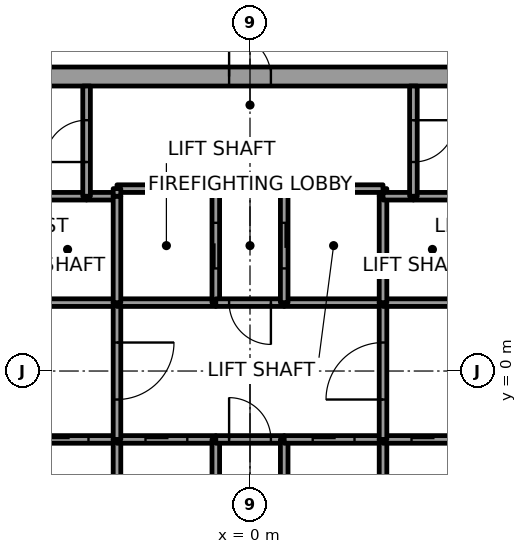
"""IFC4 building model, lengths in metres.
Left out: names, types, materials, properties, quantities, classifications, styles, units other than length and angle.
Written with IfcOpenShell. Run it as: python <this file> out.ifc"""

import sys

from ifc_helpers import new_model, si_unit, direction, frame, frame_2d, origin, place, context, subcontext, project, spatial, rectangle, extrude, element, fill, save


model = new_model("IFC4")
c1 = context("Model", 3, precision=1e-05, world=origin(), true_north=direction((0.0, 1.0)))
c2 = subcontext(c1, "Body", "Model", "MODEL_VIEW")
j1 = project(units=[si_unit("LENGTHUNIT", "METRE"), si_unit("PLANEANGLEUNIT", "RADIAN")], contexts=[c1])
p1 = place(None, origin())
s1 = spatial("IfcSite", under=j1, at=p1, CompositionType="ELEMENT")
p2 = place(p1, origin())
s2 = spatial("IfcBuilding", under=s1, at=p2, CompositionType="ELEMENT")
p3 = place(p2, frame((0.0, 0.0, 209.8)))
s3 = spatial("IfcBuildingStorey", under=s2, at=p3, CompositionType="ELEMENT", Elevation=209.8)
p4 = place(p3, frame((-11.0, 7.75, 0.0), z_axis=(0.0, 0.0, 1.0), x_axis=(1.0, 0.0, 0.0)))
e1 = element("IfcWall", 1, at=p4, inside=s3, PredefinedType="SHEAR", context=c2, shape_type="SweptSolid", body=[
    extrude(rectangle(XDim=22.0, YDim=0.5, at=frame_2d((11.0, 0.0))), origin(), (0.0, 0.0, 1.0), 4.0),
])
p5 = place(p4, frame((10.45, 0.0, 0.0)))
e2 = element("IfcOpeningElement", 2, at=p5, cuts=e1, PredefinedType="OPENING", context=c2, shape_type="SweptSolid", body=[
    extrude(rectangle(XDim=1.1, YDim=2.1, at=frame_2d((0.55, 1.05))), frame((0.0, 0.25, 0.0), z_axis=(0.0, -1.0, 0.0), x_axis=(1.0, 0.0, 0.0)), (0.0, 0.0, 1.0), 0.5),
])
p6 = place(p3, frame((-6.1, -1.8, 0.0), z_axis=(0.0, 0.0, 1.0), x_axis=(1.0, 0.0, 0.0)))
e3 = element("IfcWall", 3, at=p6, inside=s3, PredefinedType="SOLIDWALL", context=c2, shape_type="SweptSolid", body=[
    extrude(rectangle(XDim=2.6, YDim=0.2, at=frame_2d((1.3, 0.0))), origin(), (0.0, 0.0, 1.0), 3.85),
])
p7 = place(p6, frame((0.75, 0.0, 0.0)))
e4 = element("IfcOpeningElement", 4, at=p7, cuts=e3, PredefinedType="OPENING", context=c2, shape_type="SweptSolid", body=[
    extrude(rectangle(XDim=1.1, YDim=2.1, at=frame_2d((0.55, 1.05))), frame((0.0, 0.1, 0.0), z_axis=(0.0, -1.0, 0.0), x_axis=(1.0, 0.0, 0.0)), (0.0, 0.0, 1.0), 0.2),
])
p8 = place(p3, frame((-3.5, 1.8, 0.0), z_axis=(0.0, 0.0, 1.0), x_axis=(-1.0, 0.0, 0.0)))
e5 = element("IfcWall", 5, at=p8, inside=s3, PredefinedType="SOLIDWALL", context=c2, shape_type="SweptSolid", body=[
    extrude(rectangle(XDim=2.6, YDim=0.2, at=frame_2d((1.3, 0.0))), origin(), (0.0, 0.0, 1.0), 3.85),
])
p9 = place(p3, frame((-4.3, 4.6, 0.0), z_axis=(0.0, 0.0, 1.0), x_axis=(-1.0, 0.0, 0.0)))
e6 = element("IfcWall", 6, at=p9, inside=s3, PredefinedType="SOLIDWALL", context=c2, shape_type="SweptSolid", body=[
    extrude(rectangle(XDim=1.8, YDim=0.2, at=frame_2d((0.9, 0.0))), origin(), (0.0, 0.0, 1.0), 3.85),
])
p10 = place(p3, frame((-3.5, 4.6, 0.0), z_axis=(0.0, 0.0, 1.0), x_axis=(-1.0, 0.0, 0.0)))
e7 = element("IfcWall", 7, at=p10, inside=s3, PredefinedType="SOLIDWALL", context=c2, shape_type="SweptSolid", body=[
    extrude(rectangle(XDim=0.8, YDim=0.2, at=frame_2d((0.4, 0.0))), origin(), (0.0, 0.0, 1.0), 3.85),
])
p11 = place(p3, frame((-4.3, 4.6, 0.0), z_axis=(0.0, 0.0, 1.0), x_axis=(0.0, 1.0, 0.0)))
e8 = element("IfcWall", 8, at=p11, inside=s3, PredefinedType="SOLIDWALL", context=c2, shape_type="SweptSolid", body=[
    extrude(rectangle(XDim=2.9, YDim=0.2, at=frame_2d((1.45, 0.0))), origin(), (0.0, 0.0, 1.0), 3.85),
])
p12 = place(p11, frame((0.9, 0.0, 0.0)))
e9 = element("IfcOpeningElement", 9, at=p12, cuts=e8, PredefinedType="OPENING", context=c2, shape_type="SweptSolid", body=[
    extrude(rectangle(XDim=1.1, YDim=2.1, at=frame_2d((0.55, 1.05))), frame((0.0, 0.1, 0.0), z_axis=(0.0, -1.0, 0.0), x_axis=(1.0, 0.0, 0.0)), (0.0, 0.0, 1.0), 0.2),
])
p13 = place(p3, frame((-3.5, -4.6, 0.0), z_axis=(0.0, 0.0, 1.0), x_axis=(0.0, 1.0, 0.0)))
e10 = element("IfcWall", 10, at=p13, inside=s3, PredefinedType="SOLIDWALL", context=c2, shape_type="SweptSolid", body=[
    extrude(rectangle(XDim=2.8, YDim=0.2, at=frame_2d((1.4, 0.0))), origin(), (0.0, 0.0, 1.0), 3.85),
])
p14 = place(p3, frame((-3.5, -1.8, 0.0), z_axis=(0.0, 0.0, 1.0), x_axis=(1.0, 0.0, 0.0)))
e11 = element("IfcWall", 11, at=p14, inside=s3, PredefinedType="SOLIDWALL", context=c2, shape_type="SweptSolid", body=[
    extrude(rectangle(XDim=2.6, YDim=0.2, at=frame_2d((1.3, 0.0))), origin(), (0.0, 0.0, 1.0), 3.85),
])
p15 = place(p14, frame((0.75, 0.0, 0.0)))
e12 = element("IfcOpeningElement", 12, at=p15, cuts=e11, PredefinedType="OPENING", context=c2, shape_type="SweptSolid", body=[
    extrude(rectangle(XDim=1.1, YDim=2.1, at=frame_2d((0.55, 1.05))), frame((0.0, 0.1, 0.0), z_axis=(0.0, -1.0, 0.0), x_axis=(1.0, 0.0, 0.0)), (0.0, 0.0, 1.0), 0.2),
])
p16 = place(p3, frame((-3.5, 1.8, 0.0), z_axis=(0.0, 0.0, 1.0), x_axis=(0.0, -1.0, 0.0)))
e13 = element("IfcWall", 13, at=p16, inside=s3, PredefinedType="SOLIDWALL", context=c2, shape_type="SweptSolid", body=[
    extrude(rectangle(XDim=3.6, YDim=0.2, at=frame_2d((1.8, 0.0))), origin(), (0.0, 0.0, 1.0), 3.85),
])
p17 = place(p16, frame((1.05, 0.0, 0.0)))
e14 = element("IfcOpeningElement", 14, at=p17, cuts=e13, PredefinedType="OPENING", context=c2, shape_type="SweptSolid", body=[
    extrude(rectangle(XDim=1.5, YDim=2.1, at=frame_2d((0.75, 1.05))), frame((0.0, 0.1, 0.0), z_axis=(0.0, -1.0, 0.0), x_axis=(1.0, 0.0, 0.0)), (0.0, 0.0, 1.0), 0.2),
])
p18 = place(p3, frame((-0.9, 1.8, 0.0), z_axis=(0.0, 0.0, 1.0), x_axis=(-1.0, 0.0, 0.0)))
e15 = element("IfcWall", 15, at=p18, inside=s3, PredefinedType="SOLIDWALL", context=c2, shape_type="SweptSolid", body=[
    extrude(rectangle(XDim=2.6, YDim=0.2, at=frame_2d((1.3, 0.0))), origin(), (0.0, 0.0, 1.0), 3.85),
])
p19 = place(p3, frame((-3.5, 4.6, 0.0), z_axis=(0.0, 0.0, 1.0), x_axis=(0.0, -1.0, 0.0)))
e16 = element("IfcWall", 16, at=p19, inside=s3, PredefinedType="SOLIDWALL", context=c2, shape_type="SweptSolid", body=[
    extrude(rectangle(XDim=2.8, YDim=0.2, at=frame_2d((1.4, 0.0))), origin(), (0.0, 0.0, 1.0), 3.85),
])
p20 = place(p3, frame((-0.9, 1.8, 0.0), z_axis=(0.0, 0.0, 1.0), x_axis=(0.0, 1.0, 0.0)))
e17 = element("IfcWall", 17, at=p20, inside=s3, PredefinedType="SOLIDWALL", context=c2, shape_type="SweptSolid", body=[
    extrude(rectangle(XDim=3.0, YDim=0.2, at=frame_2d((1.5, 0.0))), origin(), (0.0, 0.0, 1.0), 3.85),
])
p21 = place(p20, frame((0.9, 0.0, 0.0)))
e18 = element("IfcOpeningElement", 18, at=p21, cuts=e17, PredefinedType="OPENING", context=c2, shape_type="SweptSolid", body=[
    extrude(rectangle(XDim=1.2, YDim=2.1, at=frame_2d((0.6, 1.05))), frame((0.0, 0.1, 0.0), z_axis=(0.0, -1.0, 0.0), x_axis=(1.0, 0.0, 0.0)), (0.0, 0.0, 1.0), 0.2),
])
p22 = place(p3, frame((-0.9, 4.8, 0.0), z_axis=(0.0, 0.0, 1.0), x_axis=(-1.0, 0.0, 0.0)))
e19 = element("IfcWall", 19, at=p22, inside=s3, PredefinedType="SOLIDWALL", context=c2, shape_type="SweptSolid", body=[
    extrude(rectangle(XDim=2.6, YDim=0.2, at=frame_2d((1.3, 0.0))), origin(), (0.0, 0.0, 1.0), 3.85),
])
p23 = place(p3, frame((-3.5, 4.8, 0.0), z_axis=(0.0, 0.0, 1.0), x_axis=(0.0, -1.0, 0.0)))
e20 = element("IfcWall", 20, at=p23, inside=s3, PredefinedType="SOLIDWALL", context=c2, shape_type="SweptSolid", body=[
    extrude(rectangle(XDim=0.2, YDim=0.2, at=frame_2d((0.1, 0.0))), origin(), (0.0, 0.0, 1.0), 3.85),
])
p24 = place(p3, frame((-0.9, -4.6, 0.0), z_axis=(0.0, 0.0, 1.0), x_axis=(0.0, 1.0, 0.0)))
e21 = element("IfcWall", 21, at=p24, inside=s3, PredefinedType="SOLIDWALL", context=c2, shape_type="SweptSolid", body=[
    extrude(rectangle(XDim=2.8, YDim=0.2, at=frame_2d((1.4, 0.0))), origin(), (0.0, 0.0, 1.0), 3.85),
])
p25 = place(p3, frame((-0.9, -1.8, 0.0), z_axis=(0.0, 0.0, 1.0), x_axis=(1.0, 0.0, 0.0)))
e22 = element("IfcWall", 22, at=p25, inside=s3, PredefinedType="SOLIDWALL", context=c2, shape_type="SweptSolid", body=[
    extrude(rectangle(XDim=1.8, YDim=0.2, at=frame_2d((0.9, 0.0))), origin(), (0.0, 0.0, 1.0), 3.85),
])
p26 = place(p25, frame((0.35, 0.0, 0.0)))
e23 = element("IfcOpeningElement", 23, at=p26, cuts=e22, PredefinedType="OPENING", context=c2, shape_type="SweptSolid", body=[
    extrude(rectangle(XDim=1.1, YDim=2.1, at=frame_2d((0.55, 1.05))), frame((0.0, 0.1, 0.0), z_axis=(0.0, -1.0, 0.0), x_axis=(1.0, 0.0, 0.0)), (0.0, 0.0, 1.0), 0.2),
])
p27 = place(p3, frame((0.9, 1.8, 0.0), z_axis=(0.0, 0.0, 1.0), x_axis=(-1.0, 0.0, 0.0)))
e24 = element("IfcWall", 24, at=p27, inside=s3, PredefinedType="SOLIDWALL", context=c2, shape_type="SweptSolid", body=[
    extrude(rectangle(XDim=1.8, YDim=0.2, at=frame_2d((0.9, 0.0))), origin(), (0.0, 0.0, 1.0), 3.85),
])
p28 = place(p27, frame((0.35, 0.0, 0.0)))
e25 = element("IfcOpeningElement", 25, at=p28, cuts=e24, PredefinedType="OPENING", context=c2, shape_type="SweptSolid", body=[
    extrude(rectangle(XDim=1.1, YDim=2.1, at=frame_2d((0.55, 1.05))), frame((0.0, 0.1, 0.0), z_axis=(0.0, -1.0, 0.0), x_axis=(1.0, 0.0, 0.0)), (0.0, 0.0, 1.0), 0.2),
])
p29 = place(p3, frame((0.9, -1.8, 0.0), z_axis=(0.0, 0.0, 1.0), x_axis=(0.0, -1.0, 0.0)))
e26 = element("IfcWall", 26, at=p29, inside=s3, PredefinedType="SOLIDWALL", context=c2, shape_type="SweptSolid", body=[
    extrude(rectangle(XDim=2.8, YDim=0.2, at=frame_2d((1.4, 0.0))), origin(), (0.0, 0.0, 1.0), 3.85),
])
p30 = place(p3, frame((0.9, -1.8, 0.0), z_axis=(0.0, 0.0, 1.0), x_axis=(1.0, 0.0, 0.0)))
e27 = element("IfcWall", 27, at=p30, inside=s3, PredefinedType="SOLIDWALL", context=c2, shape_type="SweptSolid", body=[
    extrude(rectangle(XDim=2.6, YDim=0.2, at=frame_2d((1.3, 0.0))), origin(), (0.0, 0.0, 1.0), 3.85),
])
p31 = place(p30, frame((0.75, 0.0, 0.0)))
e28 = element("IfcOpeningElement", 28, at=p31, cuts=e27, PredefinedType="OPENING", context=c2, shape_type="SweptSolid", body=[
    extrude(rectangle(XDim=1.1, YDim=2.1, at=frame_2d((0.55, 1.05))), frame((0.0, 0.1, 0.0), z_axis=(0.0, -1.0, 0.0), x_axis=(1.0, 0.0, 0.0)), (0.0, 0.0, 1.0), 0.2),
])
p32 = place(p3, frame((3.5, 1.8, 0.0), z_axis=(0.0, 0.0, 1.0), x_axis=(-1.0, 0.0, 0.0)))
e29 = element("IfcWall", 29, at=p32, inside=s3, PredefinedType="SOLIDWALL", context=c2, shape_type="SweptSolid", body=[
    extrude(rectangle(XDim=2.6, YDim=0.2, at=frame_2d((1.3, 0.0))), origin(), (0.0, 0.0, 1.0), 3.85),
])
p33 = place(p3, frame((3.5, 4.6, 0.0), z_axis=(0.0, 0.0, 1.0), x_axis=(0.0, 1.0, 0.0)))
e30 = element("IfcWall", 30, at=p33, inside=s3, PredefinedType="SOLIDWALL", context=c2, shape_type="SweptSolid", body=[
    extrude(rectangle(XDim=0.2, YDim=0.2, at=frame_2d((0.1, 0.0))), origin(), (0.0, 0.0, 1.0), 3.85),
])
p34 = place(p3, frame((3.5, 4.8, 0.0), z_axis=(0.0, 0.0, 1.0), x_axis=(-1.0, 0.0, 0.0)))
e31 = element("IfcWall", 31, at=p34, inside=s3, PredefinedType="SOLIDWALL", context=c2, shape_type="SweptSolid", body=[
    extrude(rectangle(XDim=2.6, YDim=0.2, at=frame_2d((1.3, 0.0))), origin(), (0.0, 0.0, 1.0), 3.85),
])
p35 = place(p3, frame((0.9, 4.8, 0.0), z_axis=(0.0, 0.0, 1.0), x_axis=(0.0, -1.0, 0.0)))
e32 = element("IfcWall", 32, at=p35, inside=s3, PredefinedType="SOLIDWALL", context=c2, shape_type="SweptSolid", body=[
    extrude(rectangle(XDim=3.0, YDim=0.2, at=frame_2d((1.5, 0.0))), origin(), (0.0, 0.0, 1.0), 3.85),
])
p36 = place(p35, frame((0.9, 0.0, 0.0)))
e33 = element("IfcOpeningElement", 33, at=p36, cuts=e32, PredefinedType="OPENING", context=c2, shape_type="SweptSolid", body=[
    extrude(rectangle(XDim=1.2, YDim=2.1, at=frame_2d((0.6, 1.05))), frame((0.0, 0.1, 0.0), z_axis=(0.0, -1.0, 0.0), x_axis=(1.0, 0.0, 0.0)), (0.0, 0.0, 1.0), 0.2),
])
p37 = place(p3, frame((3.5, -4.6, 0.0), z_axis=(0.0, 0.0, 1.0), x_axis=(0.0, 1.0, 0.0)))
e34 = element("IfcWall", 34, at=p37, inside=s3, PredefinedType="SOLIDWALL", context=c2, shape_type="SweptSolid", body=[
    extrude(rectangle(XDim=2.8, YDim=0.2, at=frame_2d((1.4, 0.0))), origin(), (0.0, 0.0, 1.0), 3.85),
])
p38 = place(p3, frame((3.5, -1.8, 0.0), z_axis=(0.0, 0.0, 1.0), x_axis=(1.0, 0.0, 0.0)))
e35 = element("IfcWall", 35, at=p38, inside=s3, PredefinedType="SOLIDWALL", context=c2, shape_type="SweptSolid", body=[
    extrude(rectangle(XDim=2.6, YDim=0.2, at=frame_2d((1.3, 0.0))), origin(), (0.0, 0.0, 1.0), 3.85),
])
p39 = place(p38, frame((0.75, 0.0, 0.0)))
e36 = element("IfcOpeningElement", 36, at=p39, cuts=e35, PredefinedType="OPENING", context=c2, shape_type="SweptSolid", body=[
    extrude(rectangle(XDim=1.1, YDim=2.1, at=frame_2d((0.55, 1.05))), frame((0.0, 0.1, 0.0), z_axis=(0.0, -1.0, 0.0), x_axis=(1.0, 0.0, 0.0)), (0.0, 0.0, 1.0), 0.2),
])
p40 = place(p3, frame((3.5, -1.8, 0.0), z_axis=(0.0, 0.0, 1.0), x_axis=(0.0, 1.0, 0.0)))
e37 = element("IfcWall", 37, at=p40, inside=s3, PredefinedType="SOLIDWALL", context=c2, shape_type="SweptSolid", body=[
    extrude(rectangle(XDim=3.6, YDim=0.2, at=frame_2d((1.8, 0.0))), origin(), (0.0, 0.0, 1.0), 3.85),
])
p41 = place(p40, frame((1.05, 0.0, 0.0)))
e38 = element("IfcOpeningElement", 38, at=p41, cuts=e37, PredefinedType="OPENING", context=c2, shape_type="SweptSolid", body=[
    extrude(rectangle(XDim=1.5, YDim=2.1, at=frame_2d((0.75, 1.05))), frame((0.0, 0.1, 0.0), z_axis=(0.0, -1.0, 0.0), x_axis=(1.0, 0.0, 0.0)), (0.0, 0.0, 1.0), 0.2),
])
p42 = place(p3, frame((6.1, 1.8, 0.0), z_axis=(0.0, 0.0, 1.0), x_axis=(-1.0, 0.0, 0.0)))
e39 = element("IfcWall", 39, at=p42, inside=s3, PredefinedType="SOLIDWALL", context=c2, shape_type="SweptSolid", body=[
    extrude(rectangle(XDim=2.6, YDim=0.2, at=frame_2d((1.3, 0.0))), origin(), (0.0, 0.0, 1.0), 3.85),
])
p43 = place(p3, frame((3.5, 1.8, 0.0), z_axis=(0.0, 0.0, 1.0), x_axis=(0.0, 1.0, 0.0)))
e40 = element("IfcWall", 40, at=p43, inside=s3, PredefinedType="SOLIDWALL", context=c2, shape_type="SweptSolid", body=[
    extrude(rectangle(XDim=2.8, YDim=0.2, at=frame_2d((1.4, 0.0))), origin(), (0.0, 0.0, 1.0), 3.85),
])
p44 = place(p3, frame((4.3, 4.6, 0.0), z_axis=(0.0, 0.0, 1.0), x_axis=(-1.0, 0.0, 0.0)))
e41 = element("IfcWall", 41, at=p44, inside=s3, PredefinedType="SOLIDWALL", context=c2, shape_type="SweptSolid", body=[
    extrude(rectangle(XDim=0.8, YDim=0.2, at=frame_2d((0.4, 0.0))), origin(), (0.0, 0.0, 1.0), 3.85),
])
p45 = place(p3, frame((6.1, 4.6, 0.0), z_axis=(0.0, 0.0, 1.0), x_axis=(-1.0, 0.0, 0.0)))
e42 = element("IfcWall", 42, at=p45, inside=s3, PredefinedType="SOLIDWALL", context=c2, shape_type="SweptSolid", body=[
    extrude(rectangle(XDim=1.8, YDim=0.2, at=frame_2d((0.9, 0.0))), origin(), (0.0, 0.0, 1.0), 3.85),
])
p46 = place(p3, frame((4.3, 7.5, 0.0), z_axis=(0.0, 0.0, 1.0), x_axis=(0.0, -1.0, 0.0)))
e43 = element("IfcWall", 43, at=p46, inside=s3, PredefinedType="SOLIDWALL", context=c2, shape_type="SweptSolid", body=[
    extrude(rectangle(XDim=2.9, YDim=0.2, at=frame_2d((1.45, 0.0))), origin(), (0.0, 0.0, 1.0), 3.85),
])
p47 = place(p46, frame((0.9, 0.0, 0.0)))
e44 = element("IfcOpeningElement", 44, at=p47, cuts=e43, PredefinedType="OPENING", context=c2, shape_type="SweptSolid", body=[
    extrude(rectangle(XDim=1.1, YDim=2.1, at=frame_2d((0.55, 1.05))), frame((0.0, 0.1, 0.0), z_axis=(0.0, -1.0, 0.0), x_axis=(1.0, 0.0, 0.0)), (0.0, 0.0, 1.0), 0.2),
])
p48 = place(p7, origin())
e45 = element("IfcDoor", 45, at=p48, inside=s3, OperationType="SLIDING_TO_RIGHT", PredefinedType="DOOR", context=c2, shape_type="SweptSolid", body=[
    extrude(rectangle(XDim=1.1, YDim=2.1, at=frame_2d((0.55, 1.05))), frame((0.0, 0.025, 0.0), z_axis=(0.0, -1.0, 0.0), x_axis=(1.0, 0.0, 0.0)), (0.0, 0.0, 1.0), 0.05),
])
fill(e4, e45)
p49 = place(p15, origin())
e46 = element("IfcDoor", 46, at=p49, inside=s3, OperationType="SLIDING_TO_LEFT", PredefinedType="DOOR", context=c2, shape_type="SweptSolid", body=[
    extrude(rectangle(XDim=1.1, YDim=2.1, at=frame_2d((0.55, 1.05))), frame((0.0, 0.025, 0.0), z_axis=(0.0, -1.0, 0.0), x_axis=(1.0, 0.0, 0.0)), (0.0, 0.0, 1.0), 0.05),
])
fill(e12, e46)
p50 = place(p31, origin())
e47 = element("IfcDoor", 47, at=p50, inside=s3, OperationType="SLIDING_TO_LEFT", PredefinedType="DOOR", context=c2, shape_type="SweptSolid", body=[
    extrude(rectangle(XDim=1.1, YDim=2.1, at=frame_2d((0.55, 1.05))), frame((0.0, 0.025, 0.0), z_axis=(0.0, -1.0, 0.0), x_axis=(1.0, 0.0, 0.0)), (0.0, 0.0, 1.0), 0.05),
])
fill(e28, e47)
p51 = place(p39, origin())
e48 = element("IfcDoor", 48, at=p51, inside=s3, OperationType="SLIDING_TO_RIGHT", PredefinedType="DOOR", context=c2, shape_type="SweptSolid", body=[
    extrude(rectangle(XDim=1.1, YDim=2.1, at=frame_2d((0.55, 1.05))), frame((0.0, 0.025, 0.0), z_axis=(0.0, -1.0, 0.0), x_axis=(1.0, 0.0, 0.0)), (0.0, 0.0, 1.0), 0.05),
])
fill(e36, e48)
p52 = place(p21, origin())
e49 = element("IfcDoor", 49, at=p52, inside=s3, OperationType="SLIDING_TO_LEFT", PredefinedType="DOOR", context=c2, shape_type="SweptSolid", body=[
    extrude(rectangle(XDim=1.2, YDim=2.1, at=frame_2d((0.6, 1.05))), frame((0.0, 0.025, 0.0), z_axis=(0.0, -1.0, 0.0), x_axis=(1.0, 0.0, 0.0)), (0.0, 0.0, 1.0), 0.05),
])
fill(e18, e49)
p53 = place(p36, origin())
e50 = element("IfcDoor", 50, at=p53, inside=s3, OperationType="SLIDING_TO_LEFT", PredefinedType="DOOR", context=c2, shape_type="SweptSolid", body=[
    extrude(rectangle(XDim=1.2, YDim=2.1, at=frame_2d((0.6, 1.05))), frame((0.0, 0.025, 0.0), z_axis=(0.0, -1.0, 0.0), x_axis=(1.0, 0.0, 0.0)), (0.0, 0.0, 1.0), 0.05),
])
fill(e33, e50)
p54 = place(p17, origin())
e51 = element("IfcDoor", 51, at=p54, inside=s3, OperationType="DOUBLE_DOOR_SINGLE_SWING", PredefinedType="DOOR", context=c2, shape_type="SweptSolid", body=[
    extrude(rectangle(XDim=1.5, YDim=2.1, at=frame_2d((0.75, 1.05))), frame((0.0, 0.025, 0.0), z_axis=(0.0, -1.0, 0.0), x_axis=(1.0, 0.0, 0.0)), (0.0, 0.0, 1.0), 0.05),
])
fill(e14, e51)
p55 = place(p41, origin())
e52 = element("IfcDoor", 52, at=p55, inside=s3, OperationType="DOUBLE_DOOR_SINGLE_SWING", PredefinedType="DOOR", context=c2, shape_type="SweptSolid", body=[
    extrude(rectangle(XDim=1.5, YDim=2.1, at=frame_2d((0.75, 1.05))), frame((0.0, 0.025, 0.0), z_axis=(0.0, -1.0, 0.0), x_axis=(1.0, 0.0, 0.0)), (0.0, 0.0, 1.0), 0.05),
])
fill(e38, e52)
p56 = place(p28, origin())
e53 = element("IfcDoor", 53, at=p56, inside=s3, OperationType="SINGLE_SWING_RIGHT", PredefinedType="DOOR", context=c2, shape_type="SweptSolid", body=[
    extrude(rectangle(XDim=1.1, YDim=2.1, at=frame_2d((0.55, 1.05))), frame((0.0, 0.025, 0.0), z_axis=(0.0, -1.0, 0.0), x_axis=(1.0, 0.0, 0.0)), (0.0, 0.0, 1.0), 0.05),
])
fill(e25, e53)
p57 = place(p26, origin())
e54 = element("IfcDoor", 54, at=p57, inside=s3, OperationType="SINGLE_SWING_RIGHT", PredefinedType="DOOR", context=c2, shape_type="SweptSolid", body=[
    extrude(rectangle(XDim=1.1, YDim=2.1, at=frame_2d((0.55, 1.05))), frame((0.0, 0.025, 0.0), z_axis=(0.0, -1.0, 0.0), x_axis=(1.0, 0.0, 0.0)), (0.0, 0.0, 1.0), 0.05),
])
fill(e23, e54)
p58 = place(p12, origin())
e55 = element("IfcDoor", 55, at=p58, inside=s3, OperationType="SINGLE_SWING_RIGHT", PredefinedType="DOOR", context=c2, shape_type="SweptSolid", body=[
    extrude(rectangle(XDim=1.1, YDim=2.1, at=frame_2d((0.55, 1.05))), frame((0.0, 0.025, 0.0), z_axis=(0.0, -1.0, 0.0), x_axis=(1.0, 0.0, 0.0)), (0.0, 0.0, 1.0), 0.05),
])
fill(e9, e55)
p59 = place(p47, origin())
e56 = element("IfcDoor", 56, at=p59, inside=s3, OperationType="SINGLE_SWING_LEFT", PredefinedType="DOOR", context=c2, shape_type="SweptSolid", body=[
    extrude(rectangle(XDim=1.1, YDim=2.1, at=frame_2d((0.55, 1.05))), frame((0.0, 0.025, 0.0), z_axis=(0.0, -1.0, 0.0), x_axis=(1.0, 0.0, 0.0)), (0.0, 0.0, 1.0), 0.05),
])
fill(e44, e56)
p60 = place(p5, origin())
e57 = element("IfcDoor", 57, at=p60, inside=s3, OperationType="SINGLE_SWING_LEFT", PredefinedType="DOOR", context=c2, shape_type="SweptSolid", body=[
    extrude(rectangle(XDim=1.1, YDim=2.1, at=frame_2d((0.55, 1.05))), frame((0.0, 0.025, 0.0), z_axis=(0.0, -1.0, 0.0), x_axis=(1.0, 0.0, 0.0)), (0.0, 0.0, 1.0), 0.05),
])
fill(e2, e57)
save(model, sys.argv[1])
